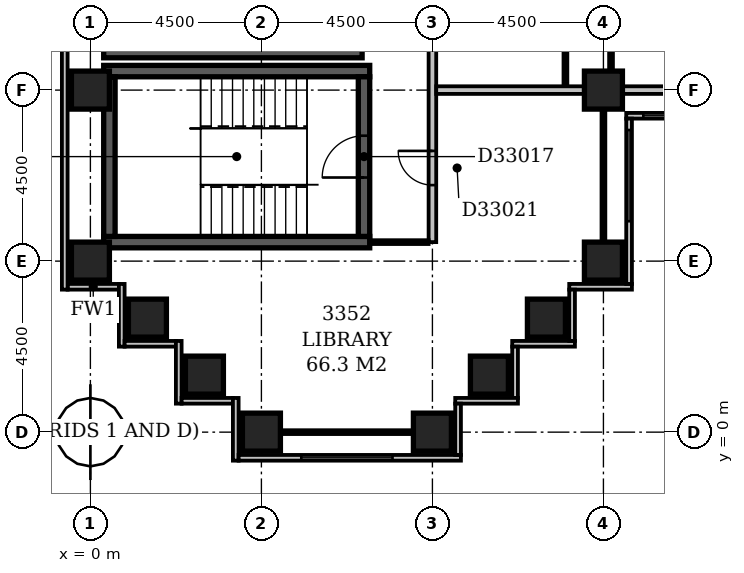
"""IFC4 building model, lengths in metres.
Left out: names, types, materials, properties, quantities, classifications, styles, units other than length and angle.
Written with IfcOpenShell. Run it as: python <this file> out.ifc"""

import sys

from ifc_helpers import new_model, si_unit, direction, frame, frame_2d, origin, origin_2d, place, context, subcontext, project, spatial, rectangle, extrude, element, fill, save


model = new_model("IFC4")
c1 = context("Model", 3, precision=1e-05, world=origin(), true_north=direction((0.0, 1.0)))
c2 = subcontext(c1, "Body", "Model", "MODEL_VIEW")
j1 = project(units=[si_unit("LENGTHUNIT", "METRE"), si_unit("PLANEANGLEUNIT", "RADIAN")], contexts=[c1])
p1 = place(None, origin())
s1 = spatial("IfcSite", under=j1, at=p1, CompositionType="ELEMENT")
p2 = place(p1, origin())
s2 = spatial("IfcBuilding", under=s1, at=p2, CompositionType="ELEMENT")
p3 = place(p2, frame((0.0, 0.0, 134.0)))
s3 = spatial("IfcBuildingStorey", under=s2, at=p3, CompositionType="ELEMENT", Elevation=134.0)
for number, where, z_axis, x_axis in (
    (1, (0.35, 5.0, -0.3), (0.0, 0.0, 1.0), (1.0, 0.0, 0.0)),
    (2, (0.35, 9.5, -0.3), (0.0, 0.0, 1.0), (1.0, 0.0, 0.0)),
):
    element("IfcWall", number, at=place(p3, frame(where, z_axis=z_axis, x_axis=x_axis)), inside=s3, PredefinedType="SHEAR", context=c2, shape_type="SweptSolid", body=[
        extrude(rectangle(XDim=7.0, YDim=0.3, at=frame_2d((3.5, 0.0))), origin(), (0.0, 0.0, 1.0), 3.6),
    ])
p4 = place(p3, frame((0.35, 10.0, -0.3), z_axis=(0.0, 0.0, 1.0), x_axis=(1.0, 0.0, 0.0)))
e3 = element("IfcWall", 3, at=p4, inside=s3, PredefinedType="SHEAR", context=c2, shape_type="SweptSolid", body=[
    extrude(rectangle(XDim=6.8, YDim=0.3, at=frame_2d((3.4, 0.0))), origin(), (0.0, 0.0, 1.0), 3.6),
])
p5 = place(p3, frame((0.5, 5.15, -0.3), z_axis=(0.0, 0.0, 1.0), x_axis=(0.0, 1.0, 0.0)))
e4 = element("IfcWall", 4, at=p5, inside=s3, PredefinedType="SHEAR", context=c2, shape_type="SweptSolid", body=[
    extrude(rectangle(XDim=4.2, YDim=0.3, at=frame_2d((2.1, 0.0))), origin(), (0.0, 0.0, 1.0), 3.6),
])
p6 = place(p3, frame((7.2, 5.15, -0.3), z_axis=(0.0, 0.0, 1.0), x_axis=(0.0, 1.0, 0.0)))
e5 = element("IfcWall", 5, at=p6, inside=s3, PredefinedType="SHEAR", context=c2, shape_type="SweptSolid", body=[
    extrude(rectangle(XDim=4.2, YDim=0.3, at=frame_2d((2.1, 0.0))), origin(), (0.0, 0.0, 1.0), 3.6),
])
p7 = place(p6, frame((1.55, 0.0, 0.3)))
e6 = element("IfcOpeningElement", 6, at=p7, cuts=e5, PredefinedType="OPENING", context=c2, shape_type="SweptSolid", body=[
    extrude(rectangle(XDim=1.1, YDim=2.1, at=frame_2d((0.55, 1.05))), frame((0.0, 0.162, 0.0), z_axis=(0.0, -1.0, 0.0), x_axis=(1.0, 0.0, 0.0)), (0.0, 0.0, 1.0), 0.324),
])
for number, where, z_axis, x_axis in (
    (7, (4.5, 0.0, -0.3), (0.0, 0.0, 1.0), (1.0, 0.0, 0.0)),
    (8, (9.0, 0.0, -0.3), (0.0, 0.0, 1.0), (1.0, 0.0, 0.0)),
    (9, (3.0, 1.5, -0.3), (0.0, 0.0, 1.0), (1.0, 0.0, 0.0)),
    (10, (10.5, 1.5, -0.3), (0.0, 0.0, 1.0), (1.0, 0.0, 0.0)),
    (11, (1.5, 3.0, -0.3), (0.0, 0.0, 1.0), (1.0, 0.0, 0.0)),
    (12, (12.0, 3.0, -0.3), (0.0, 0.0, 1.0), (1.0, 0.0, 0.0)),
    (13, (0.0, 4.5, -0.3), (0.0, 0.0, 1.0), (1.0, 0.0, 0.0)),
    (14, (13.5, 4.5, -0.3), (0.0, 0.0, 1.0), (1.0, 0.0, 0.0)),
    (15, (0.0, 9.0, -0.3), (0.0, 0.0, 1.0), (1.0, 0.0, 0.0)),
    (16, (13.5, 9.0, -0.3), (0.0, 0.0, 1.0), (1.0, 0.0, 0.0)),
):
    element("IfcColumn", number, at=place(p3, frame(where, z_axis=z_axis, x_axis=x_axis)), inside=s3, PredefinedType="COLUMN", context=c2, shape_type="SweptSolid", body=[
        extrude(rectangle(XDim=1.0, YDim=1.0, at=origin_2d()), origin(), (0.0, 0.0, 1.0), 3.6),
    ])
p8 = place(p3, frame((9.675, -0.6, 0.0), z_axis=(0.0, 0.0, 1.0), x_axis=(0.0, 1.0, 0.0)))
e17 = element("IfcWall", 17, at=p8, inside=s3, PredefinedType="STANDARD", context=c2, shape_type="SweptSolid", body=[
    extrude(rectangle(XDim=1.35, YDim=0.15, at=frame_2d((0.675, 0.0))), origin(), (0.0, 0.0, 1.0), 2.7),
])
p9 = place(p3, frame((9.6, 0.825, 0.0), z_axis=(0.0, 0.0, 1.0), x_axis=(1.0, 0.0, 0.0)))
e18 = element("IfcWall", 18, at=p9, inside=s3, PredefinedType="STANDARD", context=c2, shape_type="SweptSolid", body=[
    extrude(rectangle(XDim=1.65, YDim=0.15, at=frame_2d((0.825, 0.0))), origin(), (0.0, 0.0, 1.0), 2.7),
])
p10 = place(p3, frame((11.175, 0.9, 0.0), z_axis=(0.0, 0.0, 1.0), x_axis=(0.0, 1.0, 0.0)))
e19 = element("IfcWall", 19, at=p10, inside=s3, PredefinedType="STANDARD", context=c2, shape_type="SweptSolid", body=[
    extrude(rectangle(XDim=1.35, YDim=0.15, at=frame_2d((0.675, 0.0))), origin(), (0.0, 0.0, 1.0), 2.7),
])
p11 = place(p3, frame((11.1, 2.325, 0.0), z_axis=(0.0, 0.0, 1.0), x_axis=(1.0, 0.0, 0.0)))
e20 = element("IfcWall", 20, at=p11, inside=s3, PredefinedType="STANDARD", context=c2, shape_type="SweptSolid", body=[
    extrude(rectangle(XDim=1.65, YDim=0.15, at=frame_2d((0.825, 0.0))), origin(), (0.0, 0.0, 1.0), 2.7),
])
p12 = place(p3, frame((12.675, 2.4, 0.0), z_axis=(0.0, 0.0, 1.0), x_axis=(0.0, 1.0, 0.0)))
e21 = element("IfcWall", 21, at=p12, inside=s3, PredefinedType="STANDARD", context=c2, shape_type="SweptSolid", body=[
    extrude(rectangle(XDim=1.35, YDim=0.15, at=frame_2d((0.675, 0.0))), origin(), (0.0, 0.0, 1.0), 2.7),
])
p13 = place(p3, frame((12.6, 3.825, 0.0), z_axis=(0.0, 0.0, 1.0), x_axis=(1.0, 0.0, 0.0)))
e22 = element("IfcWall", 22, at=p13, inside=s3, PredefinedType="STANDARD", context=c2, shape_type="SweptSolid", body=[
    extrude(rectangle(XDim=1.65, YDim=0.15, at=frame_2d((0.825, 0.0))), origin(), (0.0, 0.0, 1.0), 2.7),
])
p14 = place(p3, frame((14.175, 3.9, 0.0), z_axis=(0.0, 0.0, 1.0), x_axis=(0.0, 1.0, 0.0)))
e23 = element("IfcWall", 23, at=p14, inside=s3, PredefinedType="STANDARD", context=c2, shape_type="SweptSolid", body=[
    extrude(rectangle(XDim=4.35, YDim=0.15, at=frame_2d((2.175, 0.0))), origin(), (0.0, 0.0, 1.0), 2.7),
])
p15 = place(p14, frame((1.65, 0.0, 0.6)))
e24 = element("IfcOpeningElement", 24, at=p15, cuts=e23, PredefinedType="OPENING", context=c2, shape_type="SweptSolid", body=[
    extrude(rectangle(XDim=2.4, YDim=1.8, at=frame_2d((1.2, 0.9))), frame((0.0, 0.087, 0.0), z_axis=(0.0, -1.0, 0.0), x_axis=(1.0, 0.0, 0.0)), (0.0, 0.0, 1.0), 0.174),
])
p16 = place(p3, frame((14.1, 8.325, 0.0), z_axis=(0.0, 0.0, 1.0), x_axis=(1.0, 0.0, 0.0)))
e25 = element("IfcWall", 25, at=p16, inside=s3, PredefinedType="STANDARD", context=c2, shape_type="SweptSolid", body=[
    extrude(rectangle(XDim=4.65, YDim=0.15, at=frame_2d((2.325, 0.0))), origin(), (0.0, 0.0, 1.0), 2.7),
])
p17 = place(p16, frame((0.45, 0.0, 0.6)))
e26 = element("IfcOpeningElement", 26, at=p17, cuts=e25, PredefinedType="OPENING", context=c2, shape_type="SweptSolid", body=[
    extrude(rectangle(XDim=2.4, YDim=1.8, at=frame_2d((1.2, 0.9))), frame((0.0, 0.087, 0.0), z_axis=(0.0, -1.0, 0.0), x_axis=(1.0, 0.0, 0.0)), (0.0, 0.0, 1.0), 0.174),
])
p18 = place(p3, frame((-0.675, 59.1, 0.0), z_axis=(0.0, 0.0, 1.0), x_axis=(0.0, -1.0, 0.0)))
e27 = element("IfcWall", 27, at=p18, inside=s3, PredefinedType="STANDARD", context=c2, shape_type="SweptSolid", body=[
    extrude(rectangle(XDim=55.35, YDim=0.15, at=frame_2d((27.675, 0.0))), origin(), (0.0, 0.0, 1.0), 2.7),
])
p19 = place(p3, frame((-0.6, 3.825, 0.0), z_axis=(0.0, 0.0, 1.0), x_axis=(1.0, 0.0, 0.0)))
e28 = element("IfcWall", 28, at=p19, inside=s3, PredefinedType="STANDARD", context=c2, shape_type="SweptSolid", body=[
    extrude(rectangle(XDim=1.35, YDim=0.15, at=frame_2d((0.675, 0.0))), origin(), (0.0, 0.0, 1.0), 2.7),
])
p20 = place(p3, frame((0.825, 3.9, 0.0), z_axis=(0.0, 0.0, 1.0), x_axis=(0.0, -1.0, 0.0)))
e29 = element("IfcWall", 29, at=p20, inside=s3, PredefinedType="STANDARD", context=c2, shape_type="SweptSolid", body=[
    extrude(rectangle(XDim=1.65, YDim=0.15, at=frame_2d((0.825, 0.0))), origin(), (0.0, 0.0, 1.0), 2.7),
])
p21 = place(p3, frame((0.9, 2.325, 0.0), z_axis=(0.0, 0.0, 1.0), x_axis=(1.0, 0.0, 0.0)))
e30 = element("IfcWall", 30, at=p21, inside=s3, PredefinedType="STANDARD", context=c2, shape_type="SweptSolid", body=[
    extrude(rectangle(XDim=1.35, YDim=0.15, at=frame_2d((0.675, 0.0))), origin(), (0.0, 0.0, 1.0), 2.7),
])
p22 = place(p3, frame((2.325, 2.4, 0.0), z_axis=(0.0, 0.0, 1.0), x_axis=(0.0, -1.0, 0.0)))
e31 = element("IfcWall", 31, at=p22, inside=s3, PredefinedType="STANDARD", context=c2, shape_type="SweptSolid", body=[
    extrude(rectangle(XDim=1.65, YDim=0.15, at=frame_2d((0.825, 0.0))), origin(), (0.0, 0.0, 1.0), 2.7),
])
p23 = place(p3, frame((2.4, 0.825, 0.0), z_axis=(0.0, 0.0, 1.0), x_axis=(1.0, 0.0, 0.0)))
e32 = element("IfcWall", 32, at=p23, inside=s3, PredefinedType="STANDARD", context=c2, shape_type="SweptSolid", body=[
    extrude(rectangle(XDim=1.35, YDim=0.15, at=frame_2d((0.675, 0.0))), origin(), (0.0, 0.0, 1.0), 2.7),
])
p24 = place(p3, frame((3.825, 0.9, 0.0), z_axis=(0.0, 0.0, 1.0), x_axis=(0.0, -1.0, 0.0)))
e33 = element("IfcWall", 33, at=p24, inside=s3, PredefinedType="STANDARD", context=c2, shape_type="SweptSolid", body=[
    extrude(rectangle(XDim=1.65, YDim=0.15, at=frame_2d((0.825, 0.0))), origin(), (0.0, 0.0, 1.0), 2.7),
])
p25 = place(p3, frame((3.9, -0.675, 0.0), z_axis=(0.0, 0.0, 1.0), x_axis=(1.0, 0.0, 0.0)))
e34 = element("IfcWall", 34, at=p25, inside=s3, PredefinedType="STANDARD", context=c2, shape_type="SweptSolid", body=[
    extrude(rectangle(XDim=5.85, YDim=0.15, at=frame_2d((2.925, 0.0))), origin(), (0.0, 0.0, 1.0), 2.7),
])
p26 = place(p25, frame((1.65, 0.0, 0.6)))
e35 = element("IfcOpeningElement", 35, at=p26, cuts=e34, PredefinedType="OPENING", context=c2, shape_type="SweptSolid", body=[
    extrude(rectangle(XDim=2.4, YDim=1.8, at=frame_2d((1.2, 0.9))), frame((0.0, 0.087, 0.0), z_axis=(0.0, -1.0, 0.0), x_axis=(1.0, 0.0, 0.0)), (0.0, 0.0, 1.0), 0.174),
])
p27 = place(p3, frame((5.0, 0.0, 0.0), z_axis=(0.0, 0.0, 1.0), x_axis=(1.0, 0.0, 0.0)))
e36 = element("IfcWall", 36, at=p27, inside=s3, PredefinedType="PARTITIONING", context=c2, shape_type="SweptSolid", body=[
    extrude(rectangle(XDim=3.5, YDim=0.1, at=frame_2d((1.75, 0.0))), origin(), (0.0, 0.0, 1.0), 2.7),
])
p28 = place(p3, frame((0.0, 4.5, 0.0), z_axis=(0.0, 0.0, 1.0), x_axis=(0.0, 1.0, 0.0)))
e37 = element("IfcWall", 37, at=p28, inside=s3, PredefinedType="PARTITIONING", context=c2, shape_type="SweptSolid", body=[
    extrude(rectangle(XDim=0.5, YDim=0.1, at=frame_2d((0.25, 0.0))), origin(), (0.0, 0.0, 1.0), 2.7),
])
p29 = place(p3, frame((7.349, 5.0, 0.0), z_axis=(0.0, 0.0, 1.0), x_axis=(1.0, 0.0, 0.0)))
e38 = element("IfcWall", 38, at=p29, inside=s3, PredefinedType="PARTITIONING", context=c2, shape_type="SweptSolid", body=[
    extrude(rectangle(XDim=1.551, YDim=0.1, at=frame_2d((0.775, 0.0))), origin(), (0.0, 0.0, 1.0), 3.3),
])
p30 = place(p3, frame((9.0, 5.0, 0.0), z_axis=(0.0, 0.0, 1.0), x_axis=(0.0, 1.0, 0.0)))
e39 = element("IfcWall", 39, at=p30, inside=s3, PredefinedType="PARTITIONING", context=c2, shape_type="SweptSolid", body=[
    extrude(rectangle(XDim=27.75, YDim=0.2, at=frame_2d((13.875, 0.0))), origin(), (0.0, 0.0, 1.0), 3.3),
])
p31 = place(p30, frame((23.95, 0.0, 0.0)))
e40 = element("IfcOpeningElement", 40, at=p31, cuts=e39, PredefinedType="OPENING", context=c2, shape_type="SweptSolid", body=[
    extrude(rectangle(XDim=1.0, YDim=2.1, at=frame_2d((0.5, 1.05))), frame((0.0, 0.112, 0.0), z_axis=(0.0, -1.0, 0.0), x_axis=(1.0, 0.0, 0.0)), (0.0, 0.0, 1.0), 0.224),
])
p32 = place(p30, frame((13.3, 0.0, 0.0)))
e41 = element("IfcOpeningElement", 41, at=p32, cuts=e39, PredefinedType="OPENING", context=c2, shape_type="SweptSolid", body=[
    extrude(rectangle(XDim=1.0, YDim=2.1, at=frame_2d((0.5, 1.05))), frame((0.0, 0.112, 0.0), z_axis=(0.0, -1.0, 0.0), x_axis=(1.0, 0.0, 0.0)), (0.0, 0.0, 1.0), 0.224),
])
p33 = place(p30, frame((11.7, 0.0, 0.0)))
e42 = element("IfcOpeningElement", 42, at=p33, cuts=e39, PredefinedType="OPENING", context=c2, shape_type="SweptSolid", body=[
    extrude(rectangle(XDim=1.0, YDim=2.1, at=frame_2d((0.5, 1.05))), frame((0.0, 0.112, 0.0), z_axis=(0.0, -1.0, 0.0), x_axis=(1.0, 0.0, 0.0)), (0.0, 0.0, 1.0), 0.224),
])
p34 = place(p30, frame((1.5, 0.0, 0.0)))
e43 = element("IfcOpeningElement", 43, at=p34, cuts=e39, PredefinedType="OPENING", context=c2, shape_type="SweptSolid", body=[
    extrude(rectangle(XDim=0.9, YDim=2.1, at=frame_2d((0.45, 1.05))), frame((0.0, 0.112, 0.0), z_axis=(0.0, -1.0, 0.0), x_axis=(1.0, 0.0, 0.0)), (0.0, 0.0, 1.0), 0.224),
])
p35 = place(p3, frame((13.5, 5.0, 0.0), z_axis=(0.0, 0.0, 1.0), x_axis=(0.0, 1.0, 0.0)))
e44 = element("IfcWall", 44, at=p35, inside=s3, PredefinedType="PARTITIONING", context=c2, shape_type="SweptSolid", body=[
    extrude(rectangle(XDim=3.5, YDim=0.1, at=frame_2d((1.75, 0.0))), origin(), (0.0, 0.0, 1.0), 2.7),
])
p36 = place(p3, frame((9.1, 9.0, 0.0), z_axis=(0.0, 0.0, 1.0), x_axis=(1.0, 0.0, 0.0)))
e45 = element("IfcWall", 45, at=p36, inside=s3, PredefinedType="PARTITIONING", context=c2, shape_type="SweptSolid", body=[
    extrude(rectangle(XDim=3.9, YDim=0.2, at=frame_2d((1.95, 0.0))), origin(), (0.0, 0.0, 1.0), 3.3),
])
p37 = place(p3, frame((14.0, 9.0, 0.0), z_axis=(0.0, 0.0, 1.0), x_axis=(1.0, 0.0, 0.0)))
e46 = element("IfcWall", 46, at=p37, inside=s3, PredefinedType="PARTITIONING", context=c2, shape_type="SweptSolid", body=[
    extrude(rectangle(XDim=3.5, YDim=0.2, at=frame_2d((1.75, 0.0))), origin(), (0.0, 0.0, 1.0), 2.7),
])
p38 = place(p3, frame((12.5, 9.1, 0.0), z_axis=(0.0, 0.0, 1.0), x_axis=(0.0, 1.0, 0.0)))
e47 = element("IfcWall", 47, at=p38, inside=s3, PredefinedType="PARTITIONING", context=c2, shape_type="SweptSolid", body=[
    extrude(rectangle(XDim=7.3, YDim=0.1, at=frame_2d((3.65, 0.0))), origin(), (0.0, 0.0, 1.0), 3.3),
])
p39 = place(p38, frame((5.7, 0.0, 0.0)))
e48 = element("IfcOpeningElement", 48, at=p39, cuts=e47, PredefinedType="OPENING", context=c2, shape_type="SweptSolid", body=[
    extrude(rectangle(XDim=0.8, YDim=2.1, at=frame_2d((0.4, 1.05))), frame((0.0, 0.062, 0.0), z_axis=(0.0, -1.0, 0.0), x_axis=(1.0, 0.0, 0.0)), (0.0, 0.0, 1.0), 0.124),
])
p40 = place(p38, frame((1.95, 0.0, 0.0)))
e49 = element("IfcOpeningElement", 49, at=p40, cuts=e47, PredefinedType="OPENING", context=c2, shape_type="SweptSolid", body=[
    extrude(rectangle(XDim=0.9, YDim=2.1, at=frame_2d((0.45, 1.05))), frame((0.0, 0.062, 0.0), z_axis=(0.0, -1.0, 0.0), x_axis=(1.0, 0.0, 0.0)), (0.0, 0.0, 1.0), 0.124),
])
p41 = place(p3, frame((13.7, 9.5, 0.0), z_axis=(0.0, 0.0, 1.0), x_axis=(0.0, 1.0, 0.0)))
e50 = element("IfcWall", 50, at=p41, inside=s3, PredefinedType="PARTITIONING", context=c2, shape_type="SweptSolid", body=[
    extrude(rectangle(XDim=8.4, YDim=0.1, at=frame_2d((4.2, 0.0))), origin(), (0.0, 0.0, 1.0), 3.3),
])
p42 = place(p41, frame((1.3, 0.0, 0.0)))
e51 = element("IfcOpeningElement", 51, at=p42, cuts=e50, PredefinedType="OPENING", context=c2, shape_type="SweptSolid", body=[
    extrude(rectangle(XDim=0.9, YDim=2.1, at=frame_2d((0.45, 1.05))), frame((0.0, 0.062, 0.0), z_axis=(0.0, -1.0, 0.0), x_axis=(1.0, 0.0, 0.0)), (0.0, 0.0, 1.0), 0.124),
])
p43 = place(p41, frame((5.8, 0.0, 0.0)))
e52 = element("IfcOpeningElement", 52, at=p43, cuts=e50, PredefinedType="OPENING", context=c2, shape_type="SweptSolid", body=[
    extrude(rectangle(XDim=0.9, YDim=2.1, at=frame_2d((0.45, 1.05))), frame((0.0, 0.062, 0.0), z_axis=(0.0, -1.0, 0.0), x_axis=(1.0, 0.0, 0.0)), (0.0, 0.0, 1.0), 0.124),
])
p44 = place(p15, origin())
e53 = element("IfcWindow", 53, at=p44, inside=s3, PartitioningType="SINGLE_PANEL", PredefinedType="WINDOW", context=c2, shape_type="SweptSolid", body=[
    extrude(rectangle(XDim=2.4, YDim=1.8, at=frame_2d((1.2, 0.9))), frame((0.0, 0.03, 0.0), z_axis=(0.0, -1.0, 0.0), x_axis=(1.0, 0.0, 0.0)), (0.0, 0.0, 1.0), 0.06),
])
fill(e24, e53)
p45 = place(p17, origin())
e54 = element("IfcWindow", 54, at=p45, inside=s3, PartitioningType="SINGLE_PANEL", PredefinedType="WINDOW", context=c2, shape_type="SweptSolid", body=[
    extrude(rectangle(XDim=2.4, YDim=1.8, at=frame_2d((1.2, 0.9))), frame((0.0, 0.03, 0.0), z_axis=(0.0, -1.0, 0.0), x_axis=(1.0, 0.0, 0.0)), (0.0, 0.0, 1.0), 0.06),
])
fill(e26, e54)
p46 = place(p26, origin())
e55 = element("IfcWindow", 55, at=p46, inside=s3, PartitioningType="SINGLE_PANEL", PredefinedType="WINDOW", context=c2, shape_type="SweptSolid", body=[
    extrude(rectangle(XDim=2.4, YDim=1.8, at=frame_2d((1.2, 0.9))), frame((0.0, 0.03, 0.0), z_axis=(0.0, -1.0, 0.0), x_axis=(1.0, 0.0, 0.0)), (0.0, 0.0, 1.0), 0.06),
])
fill(e35, e55)
p47 = place(p7, origin())
e56 = element("IfcDoor", 56, at=p47, inside=s3, OperationType="SINGLE_SWING_LEFT", PredefinedType="DOOR", context=c2, shape_type="SweptSolid", body=[
    extrude(rectangle(XDim=1.1, YDim=2.1, at=frame_2d((0.55, 1.05))), frame((0.0, 0.025, 0.0), z_axis=(0.0, -1.0, 0.0), x_axis=(1.0, 0.0, 0.0)), (0.0, 0.0, 1.0), 0.05),
])
fill(e6, e56)
p48 = place(p34, frame((0.9, 0.0, 0.0), z_axis=(0.0, 0.0, 1.0), x_axis=(-1.0, 0.0, 0.0)))
e57 = element("IfcDoor", 57, at=p48, inside=s3, OperationType="SINGLE_SWING_LEFT", PredefinedType="DOOR", context=c2, shape_type="SweptSolid", body=[
    extrude(rectangle(XDim=0.9, YDim=2.1, at=frame_2d((0.45, 1.05))), frame((0.0, 0.025, 0.0), z_axis=(0.0, -1.0, 0.0), x_axis=(1.0, 0.0, 0.0)), (0.0, 0.0, 1.0), 0.05),
])
fill(e43, e57)
save(model, sys.argv[1])
